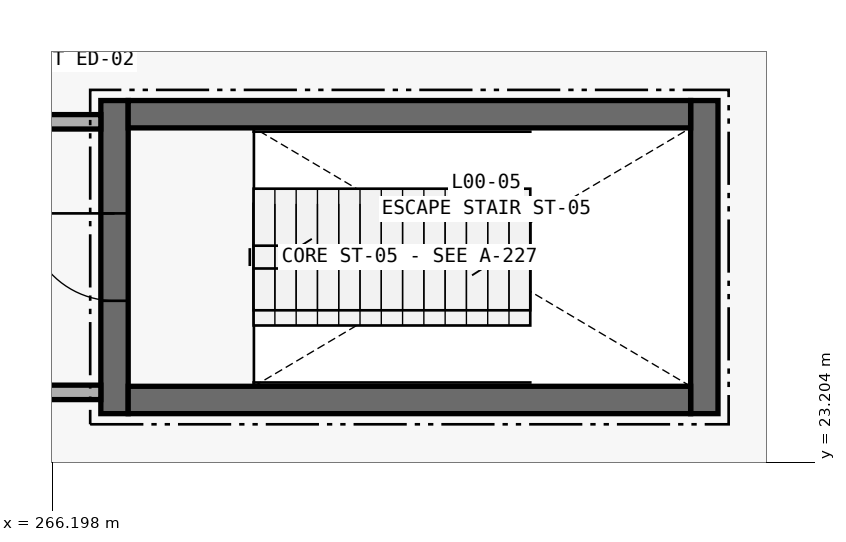
"""IFC4 building model, lengths in metres.
Left out: names, types, materials, properties, quantities, classifications, styles, units other than length and angle.
Written with IfcOpenShell. Run it as: python <this file> out.ifc"""

import sys

from ifc_helpers import new_model, si_unit, direction, frame, frame_2d, origin, place, context, subcontext, project, spatial, rectangle, extrude, element, fill, save


model = new_model("IFC4")
c1 = context("Model", 3, precision=1e-05, world=origin(), true_north=direction((0.0, 1.0)))
c2 = subcontext(c1, "Body", "Model", "MODEL_VIEW")
j1 = project(units=[si_unit("LENGTHUNIT", "METRE"), si_unit("PLANEANGLEUNIT", "RADIAN")], contexts=[c1])
p1 = place(None, origin())
s1 = spatial("IfcSite", under=j1, at=p1, CompositionType="ELEMENT")
p2 = place(p1, origin())
s2 = spatial("IfcBuilding", under=s1, at=p2, CompositionType="ELEMENT")
p3 = place(p2, origin())
s3 = spatial("IfcBuildingStorey", under=s2, at=p3, CompositionType="ELEMENT", Elevation=0.0)
p4 = place(p3, frame((267.02, 23.84, 0.0), z_axis=(0.0, 0.0, 1.0), x_axis=(0.0, 1.0, 0.0)))
e1 = element("IfcWall", 1, at=p4, inside=s3, PredefinedType="SHEAR", context=c2, shape_type="SweptSolid", body=[
    extrude(rectangle(XDim=4.12, YDim=0.36, at=frame_2d((2.06, 0.0))), origin(), (0.0, 0.0, 1.0), 4.5),
])
p5 = place(p4, frame((1.485, 0.0, 0.0)))
e2 = element("IfcOpeningElement", 2, at=p5, cuts=e1, PredefinedType="OPENING", context=c2, shape_type="SweptSolid", body=[
    extrude(rectangle(XDim=1.15, YDim=2.15, at=frame_2d((0.575, 1.075))), frame((0.0, 0.195, 0.0), z_axis=(0.0, -1.0, 0.0), x_axis=(1.0, 0.0, 0.0)), (0.0, 0.0, 1.0), 0.39),
])
p6 = place(p3, frame((274.78, 23.84, 0.0), z_axis=(0.0, 0.0, 1.0), x_axis=(0.0, 1.0, 0.0)))
e3 = element("IfcWall", 3, at=p6, inside=s3, PredefinedType="SHEAR", context=c2, shape_type="SweptSolid", body=[
    extrude(rectangle(XDim=4.12, YDim=0.36, at=frame_2d((2.06, 0.0))), origin(), (0.0, 0.0, 1.0), 4.5),
])
for number, where, z_axis, x_axis in (
    (4, (267.2, 27.78, 0.0), (0.0, 0.0, 1.0), (1.0, 0.0, 0.0)),
    (5, (267.2, 24.02, 0.0), (0.0, 0.0, 1.0), (1.0, 0.0, 0.0)),
):
    element("IfcWall", number, at=place(p3, frame(where, z_axis=z_axis, x_axis=x_axis)), inside=s3, PredefinedType="SHEAR", context=c2, shape_type="SweptSolid", body=[
        extrude(rectangle(XDim=7.4, YDim=0.36, at=frame_2d((3.7, 0.0))), origin(), (0.0, 0.0, 1.0), 4.5),
    ])
p7 = place(p3, frame((262.825, 24.12, 0.0), z_axis=(0.0, 0.0, 1.0), x_axis=(1.0, 0.0, 0.0)))
e6 = element("IfcWall", 6, at=p7, inside=s3, PredefinedType="PARTITIONING", context=c2, shape_type="SweptSolid", body=[
    extrude(rectangle(XDim=4.015, YDim=0.19, at=frame_2d((2.008, 0.0))), origin(), (0.0, 0.0, 1.0), 3.38),
])
p8 = place(p3, frame((265.685, 27.68, 0.0), z_axis=(0.0, 0.0, 1.0), x_axis=(1.0, 0.0, 0.0)))
e7 = element("IfcWall", 7, at=p8, inside=s3, PredefinedType="PARTITIONING", context=c2, shape_type="SweptSolid", body=[
    extrude(rectangle(XDim=1.155, YDim=0.19, at=frame_2d((0.578, 0.0))), origin(), (0.0, 0.0, 1.0), 3.38),
])
p9 = place(p5, origin())
e8 = element("IfcDoor", 8, at=p9, inside=s3, OperationType="SINGLE_SWING_RIGHT", PredefinedType="DOOR", context=c2, shape_type="SweptSolid", body=[
    extrude(rectangle(XDim=1.15, YDim=2.15, at=frame_2d((0.575, 1.075))), frame((0.0, 0.025, 0.0), z_axis=(0.0, -1.0, 0.0), x_axis=(1.0, 0.0, 0.0)), (0.0, 0.0, 1.0), 0.05),
])
fill(e2, e8)
save(model, sys.argv[1])
